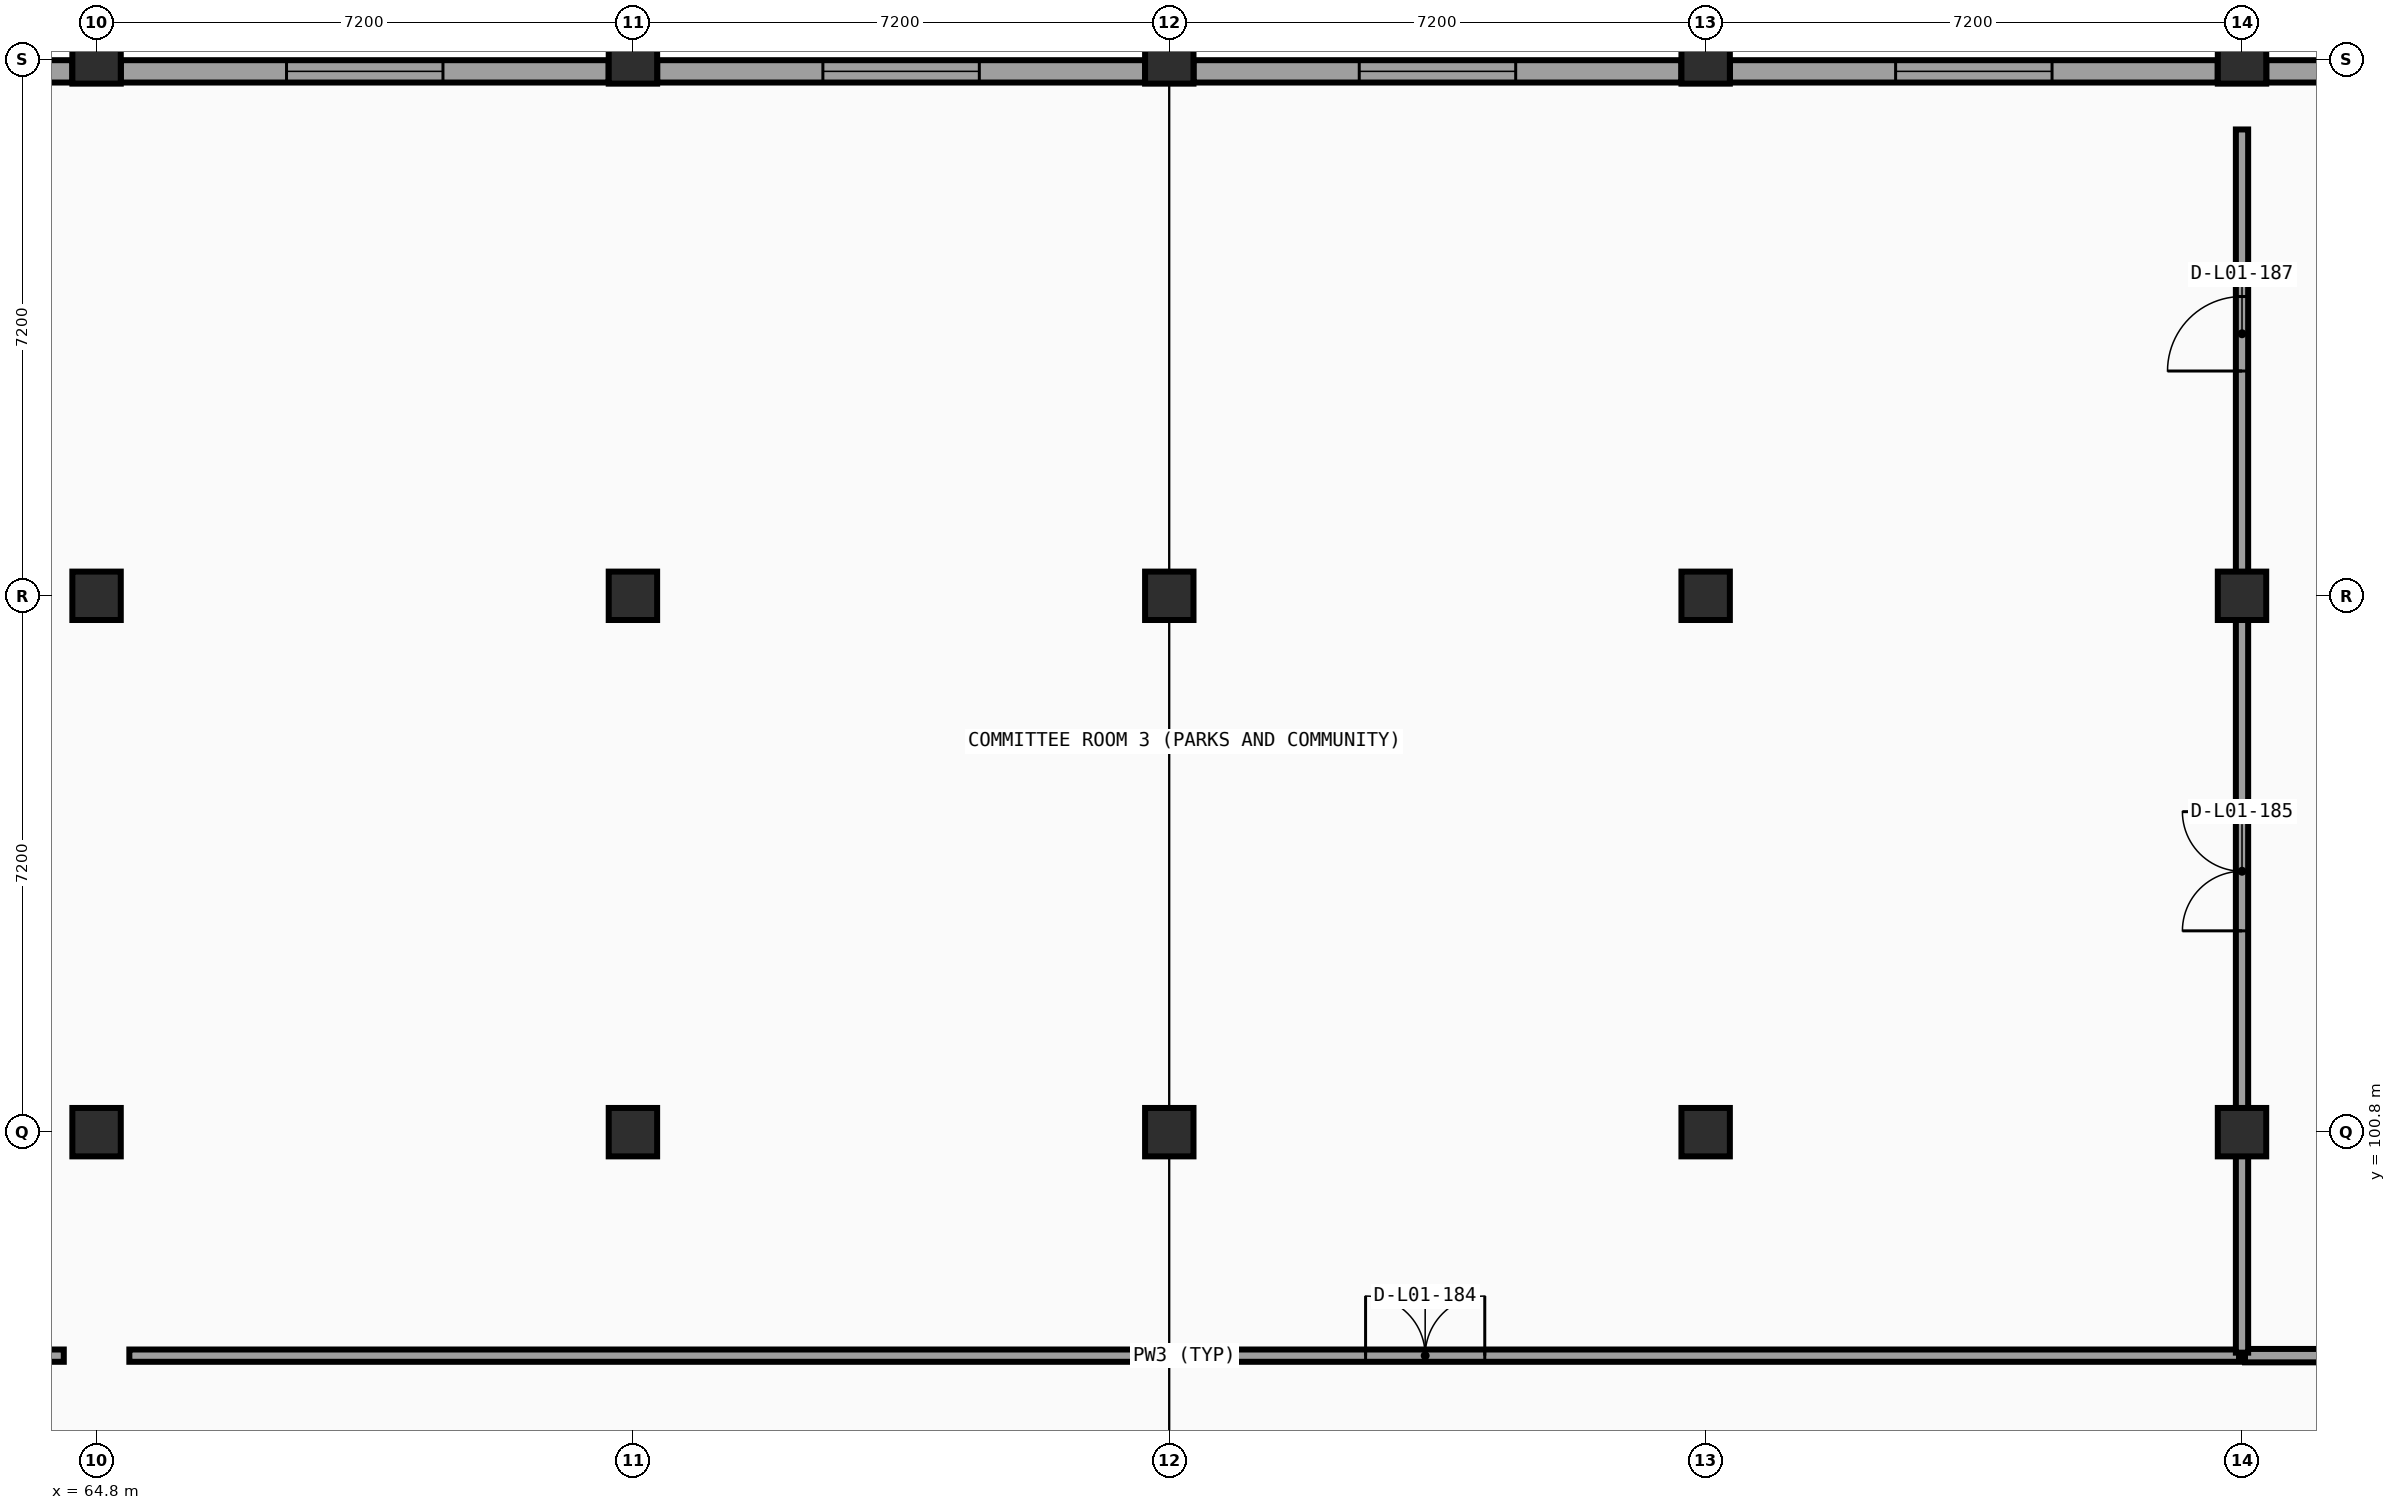
"""IFC4 building model, lengths in metres.
Left out: names, types, materials, properties, quantities, classifications, styles, units other than length and angle.
Written with IfcOpenShell. Run it as: python <this file> out.ifc"""

import sys

from ifc_helpers import new_model, si_unit, direction, frame, frame_2d, origin, origin_2d, place, context, subcontext, project, spatial, rectangle, extrude, element, fill, save


model = new_model("IFC4")
c1 = context("Model", 3, precision=1e-05, world=origin(), true_north=direction((0.0, 1.0)))
c2 = subcontext(c1, "Body", "Model", "MODEL_VIEW")
j1 = project(units=[si_unit("LENGTHUNIT", "METRE"), si_unit("PLANEANGLEUNIT", "RADIAN")], contexts=[c1])
p1 = place(None, origin())
s1 = spatial("IfcSite", under=j1, at=p1, CompositionType="ELEMENT")
p2 = place(p1, origin())
s2 = spatial("IfcBuilding", under=s1, at=p2, CompositionType="ELEMENT")
p3 = place(p2, frame((0.0, 0.0, 5.4)))
s3 = spatial("IfcBuildingStorey", under=s2, at=p3, CompositionType="ELEMENT", Elevation=5.4)
for number, where, z_axis, x_axis in (
    (1, (64.8, 100.8, 0.0), (0.0, 0.0, 1.0), (1.0, 0.0, 0.0)),
    (2, (64.8, 108.0, 0.0), (0.0, 0.0, 1.0), (1.0, 0.0, 0.0)),
    (3, (64.8, 115.2, 0.0), (0.0, 0.0, 1.0), (1.0, 0.0, 0.0)),
    (4, (72.0, 100.8, 0.0), (0.0, 0.0, 1.0), (1.0, 0.0, 0.0)),
    (5, (72.0, 108.0, 0.0), (0.0, 0.0, 1.0), (1.0, 0.0, 0.0)),
    (6, (72.0, 115.2, 0.0), (0.0, 0.0, 1.0), (1.0, 0.0, 0.0)),
    (7, (79.2, 100.8, 0.0), (0.0, 0.0, 1.0), (1.0, 0.0, 0.0)),
    (8, (79.2, 108.0, 0.0), (0.0, 0.0, 1.0), (1.0, 0.0, 0.0)),
    (9, (79.2, 115.2, 0.0), (0.0, 0.0, 1.0), (1.0, 0.0, 0.0)),
    (10, (86.4, 100.8, 0.0), (0.0, 0.0, 1.0), (1.0, 0.0, 0.0)),
    (11, (86.4, 108.0, 0.0), (0.0, 0.0, 1.0), (1.0, 0.0, 0.0)),
    (12, (86.4, 115.2, 0.0), (0.0, 0.0, 1.0), (1.0, 0.0, 0.0)),
    (13, (93.6, 100.8, 0.0), (0.0, 0.0, 1.0), (1.0, 0.0, 0.0)),
    (14, (93.6, 108.0, 0.0), (0.0, 0.0, 1.0), (1.0, 0.0, 0.0)),
    (15, (93.6, 115.2, 0.0), (0.0, 0.0, 1.0), (1.0, 0.0, 0.0)),
):
    element("IfcColumn", number, at=place(p3, frame(where, z_axis=z_axis, x_axis=x_axis)), inside=s3, PredefinedType="COLUMN", context=c2, shape_type="SweptSolid", body=[
        extrude(rectangle(XDim=0.65, YDim=0.65, at=origin_2d()), origin(), (0.0, 0.0, 1.0), 4.8),
    ])
p4 = place(p3, frame((57.926, 115.04, 0.0), z_axis=(0.0, 0.0, 1.0), x_axis=(1.0, 0.0, 0.0)))
e16 = element("IfcWall", 16, at=p4, inside=s3, PredefinedType="SOLIDWALL", context=c2, shape_type="SweptSolid", body=[
    extrude(rectangle(XDim=6.548, YDim=0.3, at=frame_2d((3.274, 0.0))), origin(), (0.0, 0.0, 1.0), 3.751),
])
p5 = place(p4, frame((2.224, 0.0, 0.85)))
e17 = element("IfcOpeningElement", 17, at=p5, cuts=e16, PredefinedType="OPENING", context=c2, shape_type="SweptSolid", body=[
    extrude(rectangle(XDim=2.1, YDim=2.0, at=frame_2d((1.05, 1.0))), frame((0.0, 0.16, 0.0), z_axis=(0.0, -1.0, 0.0), x_axis=(1.0, 0.0, 0.0)), (0.0, 0.0, 1.0), 0.32),
])
p6 = place(p3, frame((65.126, 115.04, 0.0), z_axis=(0.0, 0.0, 1.0), x_axis=(1.0, 0.0, 0.0)))
e18 = element("IfcWall", 18, at=p6, inside=s3, PredefinedType="SOLIDWALL", context=c2, shape_type="SweptSolid", body=[
    extrude(rectangle(XDim=6.548, YDim=0.3, at=frame_2d((3.274, 0.0))), origin(), (0.0, 0.0, 1.0), 3.751),
])
p7 = place(p6, frame((2.224, 0.0, 0.85)))
e19 = element("IfcOpeningElement", 19, at=p7, cuts=e18, PredefinedType="OPENING", context=c2, shape_type="SweptSolid", body=[
    extrude(rectangle(XDim=2.1, YDim=2.0, at=frame_2d((1.05, 1.0))), frame((0.0, 0.16, 0.0), z_axis=(0.0, -1.0, 0.0), x_axis=(1.0, 0.0, 0.0)), (0.0, 0.0, 1.0), 0.32),
])
p8 = place(p3, frame((72.326, 115.04, 0.0), z_axis=(0.0, 0.0, 1.0), x_axis=(1.0, 0.0, 0.0)))
e20 = element("IfcWall", 20, at=p8, inside=s3, PredefinedType="SOLIDWALL", context=c2, shape_type="SweptSolid", body=[
    extrude(rectangle(XDim=6.548, YDim=0.3, at=frame_2d((3.274, 0.0))), origin(), (0.0, 0.0, 1.0), 3.751),
])
p9 = place(p8, frame((2.224, 0.0, 0.85)))
e21 = element("IfcOpeningElement", 21, at=p9, cuts=e20, PredefinedType="OPENING", context=c2, shape_type="SweptSolid", body=[
    extrude(rectangle(XDim=2.1, YDim=2.0, at=frame_2d((1.05, 1.0))), frame((0.0, 0.16, 0.0), z_axis=(0.0, -1.0, 0.0), x_axis=(1.0, 0.0, 0.0)), (0.0, 0.0, 1.0), 0.32),
])
p10 = place(p3, frame((79.526, 115.04, 0.0), z_axis=(0.0, 0.0, 1.0), x_axis=(1.0, 0.0, 0.0)))
e22 = element("IfcWall", 22, at=p10, inside=s3, PredefinedType="SOLIDWALL", context=c2, shape_type="SweptSolid", body=[
    extrude(rectangle(XDim=6.548, YDim=0.3, at=frame_2d((3.274, 0.0))), origin(), (0.0, 0.0, 1.0), 3.751),
])
p11 = place(p10, frame((2.224, 0.0, 0.85)))
e23 = element("IfcOpeningElement", 23, at=p11, cuts=e22, PredefinedType="OPENING", context=c2, shape_type="SweptSolid", body=[
    extrude(rectangle(XDim=2.1, YDim=2.0, at=frame_2d((1.05, 1.0))), frame((0.0, 0.16, 0.0), z_axis=(0.0, -1.0, 0.0), x_axis=(1.0, 0.0, 0.0)), (0.0, 0.0, 1.0), 0.32),
])
p12 = place(p3, frame((86.726, 115.04, 0.0), z_axis=(0.0, 0.0, 1.0), x_axis=(1.0, 0.0, 0.0)))
e24 = element("IfcWall", 24, at=p12, inside=s3, PredefinedType="SOLIDWALL", context=c2, shape_type="SweptSolid", body=[
    extrude(rectangle(XDim=6.548, YDim=0.3, at=frame_2d((3.274, 0.0))), origin(), (0.0, 0.0, 1.0), 3.751),
])
p13 = place(p12, frame((2.224, 0.0, 0.85)))
e25 = element("IfcOpeningElement", 25, at=p13, cuts=e24, PredefinedType="OPENING", context=c2, shape_type="SweptSolid", body=[
    extrude(rectangle(XDim=2.1, YDim=2.0, at=frame_2d((1.05, 1.0))), frame((0.0, 0.16, 0.0), z_axis=(0.0, -1.0, 0.0), x_axis=(1.0, 0.0, 0.0)), (0.0, 0.0, 1.0), 0.32),
])
p14 = place(p3, frame((93.926, 115.04, 0.0), z_axis=(0.0, 0.0, 1.0), x_axis=(1.0, 0.0, 0.0)))
e26 = element("IfcWall", 26, at=p14, inside=s3, PredefinedType="SOLIDWALL", context=c2, shape_type="SweptSolid", body=[
    extrude(rectangle(XDim=6.548, YDim=0.3, at=frame_2d((3.274, 0.0))), origin(), (0.0, 0.0, 1.0), 3.751),
])
p15 = place(p14, frame((2.224, 0.0, 0.85)))
e27 = element("IfcOpeningElement", 27, at=p15, cuts=e26, PredefinedType="OPENING", context=c2, shape_type="SweptSolid", body=[
    extrude(rectangle(XDim=2.1, YDim=2.0, at=frame_2d((1.05, 1.0))), frame((0.0, 0.16, 0.0), z_axis=(0.0, -1.0, 0.0), x_axis=(1.0, 0.0, 0.0)), (0.0, 0.0, 1.0), 0.32),
])
p16 = place(p3, frame((43.24, 97.8, 0.0), z_axis=(0.0, 0.0, 1.0), x_axis=(1.0, 0.0, 0.0)))
e28 = element("IfcWall", 28, at=p16, inside=s3, PredefinedType="PARTITIONING", context=c2, shape_type="SweptSolid", body=[
    extrude(rectangle(XDim=21.12, YDim=0.165, at=frame_2d((10.56, 0.0))), origin(), (0.0, 0.0, 1.0), 3.801),
])
p17 = place(p16, frame((9.76, 0.0, 0.0)))
e29 = element("IfcOpeningElement", 29, at=p17, cuts=e28, PredefinedType="OPENING", context=c2, shape_type="SweptSolid", body=[
    extrude(rectangle(XDim=1.6, YDim=2.1, at=frame_2d((0.8, 1.05))), frame((0.0, 0.093, 0.0), z_axis=(0.0, -1.0, 0.0), x_axis=(1.0, 0.0, 0.0)), (0.0, 0.0, 1.0), 0.185),
])
p18 = place(p3, frame((65.24, 97.8, 0.0), z_axis=(0.0, 0.0, 1.0), x_axis=(1.0, 0.0, 0.0)))
e30 = element("IfcWall", 30, at=p18, inside=s3, PredefinedType="PARTITIONING", context=c2, shape_type="SweptSolid", body=[
    extrude(rectangle(XDim=28.32, YDim=0.165, at=frame_2d((14.16, 0.0))), origin(), (0.0, 0.0, 1.0), 3.801),
])
p19 = place(p18, frame((16.595, 0.0, 0.0)))
e31 = element("IfcOpeningElement", 31, at=p19, cuts=e30, PredefinedType="OPENING", context=c2, shape_type="SweptSolid", body=[
    extrude(rectangle(XDim=1.6, YDim=2.1, at=frame_2d((0.8, 1.05))), frame((0.0, 0.093, 0.0), z_axis=(0.0, -1.0, 0.0), x_axis=(1.0, 0.0, 0.0)), (0.0, 0.0, 1.0), 0.185),
])
p20 = place(p3, frame((93.64, 97.8, 0.0), z_axis=(0.0, 0.0, 1.0), x_axis=(1.0, 0.0, 0.0)))
e32 = element("IfcWall", 32, at=p20, inside=s3, PredefinedType="PARTITIONING", context=c2, shape_type="SweptSolid", body=[
    extrude(rectangle(XDim=35.02, YDim=0.18, at=frame_2d((17.51, 0.0))), origin(), (0.0, 0.0, 1.0), 3.801),
])
p21 = place(p20, frame((17.01, 0.0, 0.0)))
e33 = element("IfcOpeningElement", 33, at=p21, cuts=e32, PredefinedType="OPENING", context=c2, shape_type="SweptSolid", body=[
    extrude(rectangle(XDim=1.0, YDim=2.1, at=frame_2d((0.5, 1.05))), frame((0.0, 0.1, 0.0), z_axis=(0.0, -1.0, 0.0), x_axis=(1.0, 0.0, 0.0)), (0.0, 0.0, 1.0), 0.2),
])
p22 = place(p3, frame((93.6, 97.84, 0.0), z_axis=(0.0, 0.0, 1.0), x_axis=(0.0, 1.0, 0.0)))
e34 = element("IfcWall", 34, at=p22, inside=s3, PredefinedType="PARTITIONING", context=c2, shape_type="SweptSolid", body=[
    extrude(rectangle(XDim=16.42, YDim=0.165, at=frame_2d((8.21, 0.0))), origin(), (0.0, 0.0, 1.0), 3.801),
])
p23 = place(p22, frame((5.663, 0.0, 0.0)))
e35 = element("IfcOpeningElement", 35, at=p23, cuts=e34, PredefinedType="OPENING", context=c2, shape_type="SweptSolid", body=[
    extrude(rectangle(XDim=1.6, YDim=2.1, at=frame_2d((0.8, 1.05))), frame((0.0, 0.093, 0.0), z_axis=(0.0, -1.0, 0.0), x_axis=(1.0, 0.0, 0.0)), (0.0, 0.0, 1.0), 0.185),
])
p24 = place(p22, frame((13.177, 0.0, 0.0)))
e36 = element("IfcOpeningElement", 36, at=p24, cuts=e34, PredefinedType="OPENING", context=c2, shape_type="SweptSolid", body=[
    extrude(rectangle(XDim=1.0, YDim=2.1, at=frame_2d((0.5, 1.05))), frame((0.0, 0.093, 0.0), z_axis=(0.0, -1.0, 0.0), x_axis=(1.0, 0.0, 0.0)), (0.0, 0.0, 1.0), 0.185),
])
p25 = place(p7, origin())
e37 = element("IfcWindow", 37, at=p25, inside=s3, PartitioningType="SINGLE_PANEL", PredefinedType="WINDOW", context=c2, shape_type="SweptSolid", body=[
    extrude(rectangle(XDim=2.1, YDim=2.0, at=frame_2d((1.05, 1.0))), frame((0.0, 0.03, 0.0), z_axis=(0.0, -1.0, 0.0), x_axis=(1.0, 0.0, 0.0)), (0.0, 0.0, 1.0), 0.06),
])
fill(e19, e37)
p26 = place(p9, origin())
e38 = element("IfcWindow", 38, at=p26, inside=s3, PartitioningType="SINGLE_PANEL", PredefinedType="WINDOW", context=c2, shape_type="SweptSolid", body=[
    extrude(rectangle(XDim=2.1, YDim=2.0, at=frame_2d((1.05, 1.0))), frame((0.0, 0.03, 0.0), z_axis=(0.0, -1.0, 0.0), x_axis=(1.0, 0.0, 0.0)), (0.0, 0.0, 1.0), 0.06),
])
fill(e21, e38)
p27 = place(p11, origin())
e39 = element("IfcWindow", 39, at=p27, inside=s3, PartitioningType="SINGLE_PANEL", PredefinedType="WINDOW", context=c2, shape_type="SweptSolid", body=[
    extrude(rectangle(XDim=2.1, YDim=2.0, at=frame_2d((1.05, 1.0))), frame((0.0, 0.03, 0.0), z_axis=(0.0, -1.0, 0.0), x_axis=(1.0, 0.0, 0.0)), (0.0, 0.0, 1.0), 0.06),
])
fill(e23, e39)
p28 = place(p13, origin())
e40 = element("IfcWindow", 40, at=p28, inside=s3, PartitioningType="SINGLE_PANEL", PredefinedType="WINDOW", context=c2, shape_type="SweptSolid", body=[
    extrude(rectangle(XDim=2.1, YDim=2.0, at=frame_2d((1.05, 1.0))), frame((0.0, 0.03, 0.0), z_axis=(0.0, -1.0, 0.0), x_axis=(1.0, 0.0, 0.0)), (0.0, 0.0, 1.0), 0.06),
])
fill(e25, e40)
p29 = place(p19, origin())
e41 = element("IfcDoor", 41, at=p29, inside=s3, OperationType="DOUBLE_DOOR_SINGLE_SWING", PredefinedType="DOOR", context=c2, shape_type="SweptSolid", body=[
    extrude(rectangle(XDim=1.6, YDim=2.1, at=frame_2d((0.8, 1.05))), frame((0.0, 0.025, 0.0), z_axis=(0.0, -1.0, 0.0), x_axis=(1.0, 0.0, 0.0)), (0.0, 0.0, 1.0), 0.05),
])
fill(e31, e41)
p30 = place(p23, origin())
e42 = element("IfcDoor", 42, at=p30, inside=s3, OperationType="DOUBLE_DOOR_SINGLE_SWING", PredefinedType="DOOR", context=c2, shape_type="SweptSolid", body=[
    extrude(rectangle(XDim=1.6, YDim=2.1, at=frame_2d((0.8, 1.05))), frame((0.0, 0.025, 0.0), z_axis=(0.0, -1.0, 0.0), x_axis=(1.0, 0.0, 0.0)), (0.0, 0.0, 1.0), 0.05),
])
fill(e35, e42)
p31 = place(p24, origin())
e43 = element("IfcDoor", 43, at=p31, inside=s3, OperationType="SINGLE_SWING_LEFT", PredefinedType="DOOR", context=c2, shape_type="SweptSolid", body=[
    extrude(rectangle(XDim=1.0, YDim=2.1, at=frame_2d((0.5, 1.05))), frame((0.0, 0.025, 0.0), z_axis=(0.0, -1.0, 0.0), x_axis=(1.0, 0.0, 0.0)), (0.0, 0.0, 1.0), 0.05),
])
fill(e36, e43)
save(model, sys.argv[1])
